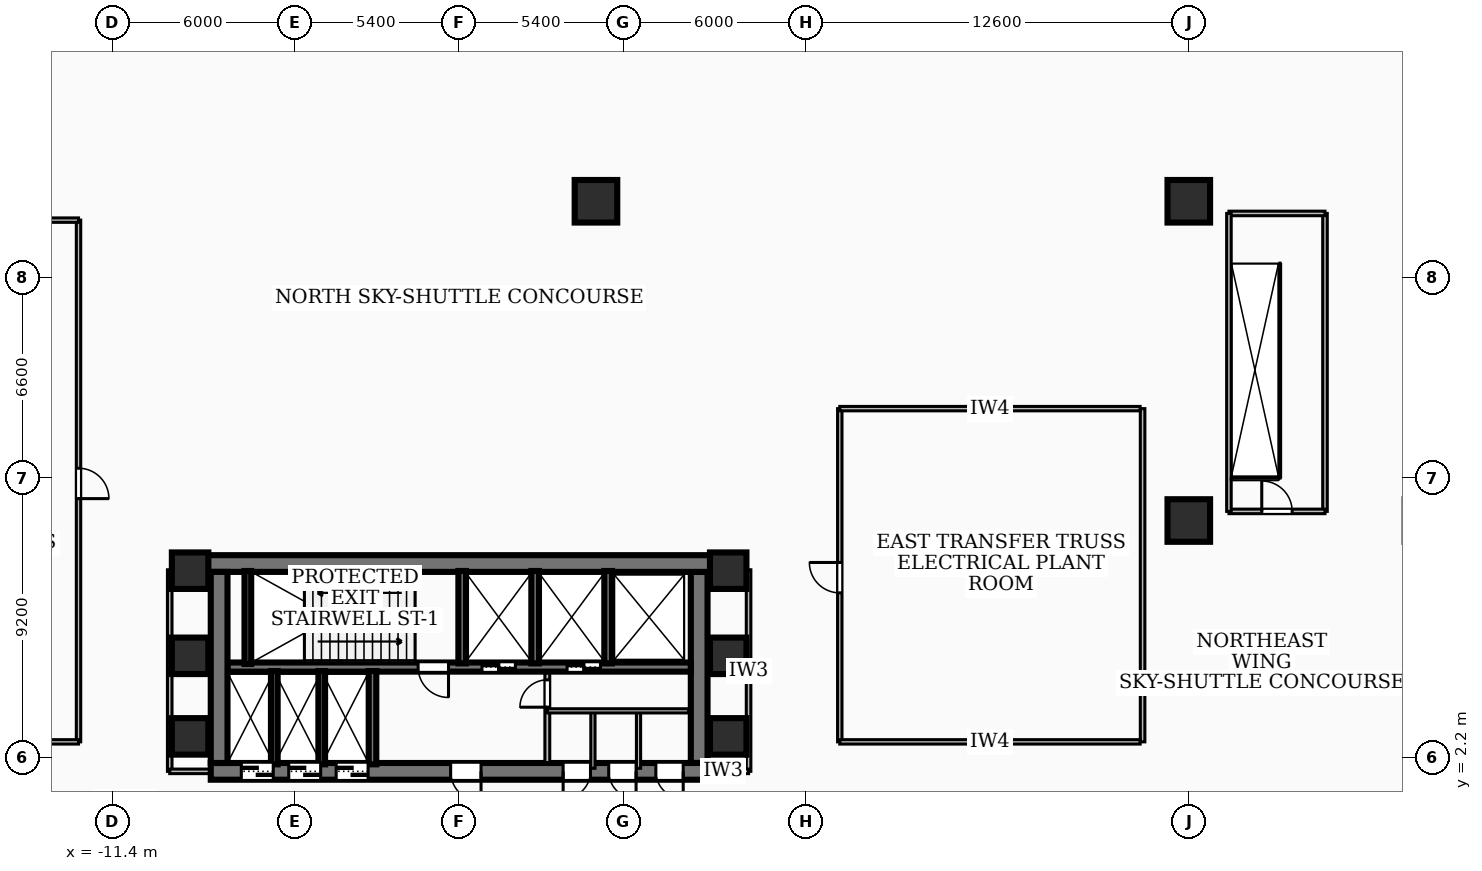
"""IFC4 building model, lengths in metres.
Left out: names, types, materials, properties, quantities, classifications, styles, units other than length and angle.
Written with IfcOpenShell. Run it as: python <this file> out.ifc"""

import sys

from ifc_helpers import new_model, si_unit, direction, frame, frame_2d, origin, origin_2d, place, context, subcontext, project, spatial, rectangle, extrude, element, fill, save


model = new_model("IFC4")
c1 = context("Model", 3, precision=1e-05, world=origin(), true_north=direction((0.0, 1.0)))
c2 = subcontext(c1, "Body", "Model", "MODEL_VIEW")
j1 = project(units=[si_unit("LENGTHUNIT", "METRE"), si_unit("PLANEANGLEUNIT", "RADIAN")], contexts=[c1])
p1 = place(None, origin())
s1 = spatial("IfcSite", under=j1, at=p1, CompositionType="ELEMENT")
p2 = place(p1, origin())
s2 = spatial("IfcBuilding", under=s1, at=p2, CompositionType="ELEMENT")
p3 = place(p2, frame((0.0, 0.0, 19.44)))
s3 = spatial("IfcBuildingStorey", under=s2, at=p3, CompositionType="ELEMENT", Elevation=19.44)
p4 = place(p3, frame((-8.78, 8.585, 0.0), z_axis=(0.0, 0.0, 1.0), x_axis=(1.0, 0.0, 0.0)))
e1 = element("IfcWall", 1, at=p4, inside=s3, PredefinedType="SHEAR", context=c2, shape_type="SweptSolid", body=[
    extrude(rectangle(XDim=17.56, YDim=0.55, at=frame_2d((8.78, 0.0))), origin(), (0.0, 0.0, 1.0), 4.78),
])
p5 = place(p3, frame((8.17, 1.75, 0.0), z_axis=(0.0, 0.0, 1.0), x_axis=(-1.0, 0.0, 0.0)))
e2 = element("IfcWall", 2, at=p5, inside=s3, PredefinedType="SHEAR", context=c2, shape_type="SweptSolid", body=[
    extrude(rectangle(XDim=16.34, YDim=0.55, at=frame_2d((8.17, 0.0))), origin(), (0.0, 0.0, 1.0), 4.78),
])
p6 = place(p5, frame((7.45, 0.0, 0.0)))
e3 = element("IfcOpeningElement", 3, at=p6, cuts=e2, PredefinedType="OPENING", context=c2, shape_type="SweptSolid", body=[
    extrude(rectangle(XDim=1.0, YDim=2.1, at=frame_2d((0.5, 1.05))), frame((0.0, 0.285, 0.0), z_axis=(0.0, -1.0, 0.0), x_axis=(1.0, 0.0, 0.0)), (0.0, 0.0, 1.0), 0.57),
])
p7 = place(p5, frame((14.285, 0.0, 0.0)))
e4 = element("IfcOpeningElement", 4, at=p7, cuts=e2, PredefinedType="OPENING", context=c2, shape_type="SweptSolid", body=[
    extrude(rectangle(XDim=1.05, YDim=2.15, at=frame_2d((0.525, 1.075))), frame((0.0, 0.285, 0.0), z_axis=(0.0, -1.0, 0.0), x_axis=(1.0, 0.0, 0.0)), (0.0, 0.0, 1.0), 0.57),
])
p8 = place(p5, frame((12.725, 0.0, 0.0)))
e5 = element("IfcOpeningElement", 5, at=p8, cuts=e2, PredefinedType="OPENING", context=c2, shape_type="SweptSolid", body=[
    extrude(rectangle(XDim=1.05, YDim=2.15, at=frame_2d((0.525, 1.075))), frame((0.0, 0.285, 0.0), z_axis=(0.0, -1.0, 0.0), x_axis=(1.0, 0.0, 0.0)), (0.0, 0.0, 1.0), 0.57),
])
p9 = place(p5, frame((11.165, 0.0, 0.0)))
e6 = element("IfcOpeningElement", 6, at=p9, cuts=e2, PredefinedType="OPENING", context=c2, shape_type="SweptSolid", body=[
    extrude(rectangle(XDim=1.05, YDim=2.15, at=frame_2d((0.525, 1.075))), frame((0.0, 0.285, 0.0), z_axis=(0.0, -1.0, 0.0), x_axis=(1.0, 0.0, 0.0)), (0.0, 0.0, 1.0), 0.57),
])
p10 = place(p5, frame((3.85, 0.0, 0.0)))
e7 = element("IfcOpeningElement", 7, at=p10, cuts=e2, PredefinedType="OPENING", context=c2, shape_type="SweptSolid", body=[
    extrude(rectangle(XDim=0.9, YDim=2.06, at=frame_2d((0.45, 1.03))), frame((0.0, 0.285, 0.0), z_axis=(0.0, -1.0, 0.0), x_axis=(1.0, 0.0, 0.0)), (0.0, 0.0, 1.0), 0.57),
])
p11 = place(p5, frame((2.35, 0.0, 0.0)))
e8 = element("IfcOpeningElement", 8, at=p11, cuts=e2, PredefinedType="OPENING", context=c2, shape_type="SweptSolid", body=[
    extrude(rectangle(XDim=0.9, YDim=2.06, at=frame_2d((0.45, 1.03))), frame((0.0, 0.285, 0.0), z_axis=(0.0, -1.0, 0.0), x_axis=(1.0, 0.0, 0.0)), (0.0, 0.0, 1.0), 0.57),
])
p12 = place(p5, frame((0.8, 0.0, 0.0)))
e9 = element("IfcOpeningElement", 9, at=p12, cuts=e2, PredefinedType="OPENING", context=c2, shape_type="SweptSolid", body=[
    extrude(rectangle(XDim=0.9, YDim=2.06, at=frame_2d((0.45, 1.03))), frame((0.0, 0.285, 0.0), z_axis=(0.0, -1.0, 0.0), x_axis=(1.0, 0.0, 0.0)), (0.0, 0.0, 1.0), 0.57),
])
for number, where, z_axis, x_axis in (
    (10, (-7.895, 2.025, 0.0), (0.0, 0.0, 1.0), (0.0, 1.0, 0.0)),
    (11, (7.895, 8.31, 0.0), (0.0, 0.0, 1.0), (0.0, -1.0, 0.0)),
):
    element("IfcWall", number, at=place(p3, frame(where, z_axis=z_axis, x_axis=x_axis)), inside=s3, PredefinedType="SHEAR", context=c2, shape_type="SweptSolid", body=[
        extrude(rectangle(XDim=6.285, YDim=0.55, at=frame_2d((3.143, 0.0))), origin(), (0.0, 0.0, 1.0), 4.78),
    ])
p13 = place(p3, frame((7.62, 5.18, 0.0), z_axis=(0.0, 0.0, 1.0), x_axis=(-1.0, 0.0, 0.0)))
e12 = element("IfcWall", 12, at=p13, inside=s3, PredefinedType="SOLIDWALL", context=c2, shape_type="SweptSolid", body=[
    extrude(rectangle(XDim=15.24, YDim=0.3, at=frame_2d((7.62, 0.0))), origin(), (0.0, 0.0, 1.0), 4.78),
])
p14 = place(p13, frame((5.77, 0.0, 0.0)))
e13 = element("IfcOpeningElement", 13, at=p14, cuts=e12, PredefinedType="OPENING", context=c2, shape_type="SweptSolid", body=[
    extrude(rectangle(XDim=1.1, YDim=2.15, at=frame_2d((0.55, 1.075))), frame((0.0, 0.16, 0.0), z_axis=(0.0, -1.0, 0.0), x_axis=(1.0, 0.0, 0.0)), (0.0, 0.0, 1.0), 0.32),
])
p15 = place(p13, frame((2.97, 0.0, 0.0)))
e14 = element("IfcOpeningElement", 14, at=p15, cuts=e12, PredefinedType="OPENING", context=c2, shape_type="SweptSolid", body=[
    extrude(rectangle(XDim=1.1, YDim=2.15, at=frame_2d((0.55, 1.075))), frame((0.0, 0.16, 0.0), z_axis=(0.0, -1.0, 0.0), x_axis=(1.0, 0.0, 0.0)), (0.0, 0.0, 1.0), 0.32),
])
p16 = place(p13, frame((7.97, 0.0, 0.0)))
e15 = element("IfcOpeningElement", 15, at=p16, cuts=e12, PredefinedType="OPENING", context=c2, shape_type="SweptSolid", body=[
    extrude(rectangle(XDim=1.0, YDim=2.1, at=frame_2d((0.5, 1.05))), frame((0.0, 0.16, 0.0), z_axis=(0.0, -1.0, 0.0), x_axis=(1.0, 0.0, 0.0)), (0.0, 0.0, 1.0), 0.32),
])
p17 = place(p3, frame((-6.95, 5.28, 0.0), z_axis=(0.0, 0.0, 1.0), x_axis=(0.0, 1.0, 0.0)))
e16 = element("IfcWall", 16, at=p17, inside=s3, PredefinedType="SOLIDWALL", context=c2, shape_type="SweptSolid", body=[
    extrude(rectangle(XDim=3.06, YDim=0.22, at=frame_2d((1.53, 0.0))), origin(), (0.0, 0.0, 1.0), 4.78),
])
for number, where, z_axis, x_axis in (
    (17, (0.1, 5.3, 0.0), (0.0, 0.0, 1.0), (0.0, 1.0, 0.0)),
    (18, (2.5, 5.3, 0.0), (0.0, 0.0, 1.0), (0.0, 1.0, 0.0)),
    (19, (4.9, 5.3, 0.0), (0.0, 0.0, 1.0), (0.0, 1.0, 0.0)),
):
    element("IfcWall", number, at=place(p3, frame(where, z_axis=z_axis, x_axis=x_axis)), inside=s3, PredefinedType="SOLIDWALL", context=c2, shape_type="SweptSolid", body=[
        extrude(rectangle(XDim=3.04, YDim=0.25, at=frame_2d((1.52, 0.0))), origin(), (0.0, 0.0, 1.0), 4.78),
    ])
p18 = place(p3, frame((-2.85, 1.98, 0.0), z_axis=(0.0, 0.0, 1.0), x_axis=(0.0, 1.0, 0.0)))
e20 = element("IfcWall", 20, at=p18, inside=s3, PredefinedType="SOLIDWALL", context=c2, shape_type="SweptSolid", body=[
    extrude(rectangle(XDim=3.07, YDim=0.25, at=frame_2d((1.535, 0.0))), origin(), (0.0, 0.0, 1.0), 4.78),
])
for number, where, z_axis, x_axis in (
    (21, (-6.08, 1.98, 0.0), (0.0, 0.0, 1.0), (0.0, 1.0, 0.0)),
    (22, (-4.52, 1.98, 0.0), (0.0, 0.0, 1.0), (0.0, 1.0, 0.0)),
):
    element("IfcWall", number, at=place(p3, frame(where, z_axis=z_axis, x_axis=x_axis)), inside=s3, PredefinedType="SOLIDWALL", context=c2, shape_type="SweptSolid", body=[
        extrude(rectangle(XDim=3.07, YDim=0.22, at=frame_2d((1.535, 0.0))), origin(), (0.0, 0.0, 1.0), 4.78),
    ])
for number, where, z_axis, x_axis in (
    (23, (-8.85, 2.9, 0.0), (0.0, 0.0, 1.0), (1.0, 0.0, 0.0)),
    (24, (-8.85, 5.55, 0.0), (0.0, 0.0, 1.0), (1.0, 0.0, 0.0)),
    (25, (8.85, 2.9, 0.0), (0.0, 0.0, 1.0), (1.0, 0.0, 0.0)),
    (26, (8.85, 5.55, 0.0), (0.0, 0.0, 1.0), (1.0, 0.0, 0.0)),
    (27, (-8.85, 8.35, 0.0), (0.0, 0.0, 1.0), (1.0, 0.0, 0.0)),
    (28, (8.85, 8.35, 0.0), (0.0, 0.0, 1.0), (1.0, 0.0, 0.0)),
):
    element("IfcColumn", number, at=place(p3, frame(where, z_axis=z_axis, x_axis=x_axis)), inside=s3, PredefinedType="COLUMN", context=c2, shape_type="SweptSolid", body=[
        extrude(rectangle(XDim=1.2, YDim=1.2, at=origin_2d()), origin(), (0.0, 0.0, 1.0), 5.04),
    ])
for number, where, z_axis, x_axis in (
    (29, (24.0, 10.0, 0.0), (0.0, 0.0, 1.0), (1.0, 0.0, 0.0)),
    (30, (4.5, 20.5, 0.0), (0.0, 0.0, 1.0), (1.0, 0.0, 0.0)),
    (31, (24.0, 20.5, 0.0), (0.0, 0.0, 1.0), (1.0, 0.0, 0.0)),
):
    element("IfcColumn", number, at=place(p3, frame(where, z_axis=z_axis, x_axis=x_axis)), inside=s3, PredefinedType="COLUMN", context=c2, shape_type="SweptSolid", body=[
        extrude(rectangle(XDim=1.4, YDim=1.4, at=origin_2d()), origin(), (0.0, 0.0, 1.0), 5.04),
    ])
for number, where, z_axis, x_axis in (
    (32, (25.32, 10.3, 0.0), (0.0, 0.0, 1.0), (0.0, 1.0, 0.0)),
    (33, (28.48, 10.3, 0.0), (0.0, 0.0, 1.0), (0.0, 1.0, 0.0)),
):
    element("IfcWall", number, at=place(p3, frame(where, z_axis=z_axis, x_axis=x_axis)), inside=s3, PredefinedType="PARTITIONING", context=c2, shape_type="SweptSolid", body=[
        extrude(rectangle(XDim=9.8, YDim=0.15, at=frame_2d((4.9, 0.0))), origin(), (0.0, 0.0, 1.0), 2.572),
    ])
p19 = place(p3, frame((25.32, 10.3, 0.0), z_axis=(0.0, 0.0, 1.0), x_axis=(1.0, 0.0, 0.0)))
e34 = element("IfcWall", 34, at=p19, inside=s3, PredefinedType="PARTITIONING", context=c2, shape_type="SweptSolid", body=[
    extrude(rectangle(XDim=3.16, YDim=0.15, at=frame_2d((1.58, 0.0))), origin(), (0.0, 0.0, 1.0), 2.572),
])
p20 = place(p19, frame((1.08, 0.0, 0.0)))
e35 = element("IfcOpeningElement", 35, at=p20, cuts=e34, PredefinedType="OPENING", context=c2, shape_type="SweptSolid", body=[
    extrude(rectangle(XDim=1.0, YDim=2.1, at=frame_2d((0.5, 1.05))), frame((0.0, 0.085, 0.0), z_axis=(0.0, -1.0, 0.0), x_axis=(1.0, 0.0, 0.0)), (0.0, 0.0, 1.0), 0.17),
])
p21 = place(p3, frame((28.48, 20.1, 0.0), z_axis=(0.0, 0.0, 1.0), x_axis=(-1.0, 0.0, 0.0)))
e36 = element("IfcWall", 36, at=p21, inside=s3, PredefinedType="PARTITIONING", context=c2, shape_type="SweptSolid", body=[
    extrude(rectangle(XDim=3.16, YDim=0.15, at=frame_2d((1.58, 0.0))), origin(), (0.0, 0.0, 1.0), 4.78),
])
p22 = place(p3, frame((2.9, 2.04, 0.0), z_axis=(0.0, 0.0, 1.0), x_axis=(0.0, 1.0, 0.0)))
e37 = element("IfcWall", 37, at=p22, inside=s3, PredefinedType="PARTITIONING", context=c2, shape_type="SweptSolid", body=[
    extrude(rectangle(XDim=2.94, YDim=0.16, at=frame_2d((1.47, 0.0))), origin(), (0.0, 0.0, 1.0), 3.845),
])
p23 = place(p22, frame((1.82, 0.0, 0.0)))
e38 = element("IfcOpeningElement", 38, at=p23, cuts=e37, PredefinedType="OPENING", context=c2, shape_type="SweptSolid", body=[
    extrude(rectangle(XDim=0.9, YDim=2.06, at=frame_2d((0.45, 1.03))), frame((0.0, 0.09, 0.0), z_axis=(0.0, -1.0, 0.0), x_axis=(1.0, 0.0, 0.0)), (0.0, 0.0, 1.0), 0.18),
])
p24 = place(p3, frame((2.9, 3.74, 0.0), z_axis=(0.0, 0.0, 1.0), x_axis=(1.0, 0.0, 0.0)))
e39 = element("IfcWall", 39, at=p24, inside=s3, PredefinedType="PARTITIONING", context=c2, shape_type="SweptSolid", body=[
    extrude(rectangle(XDim=4.65, YDim=0.138, at=frame_2d((2.325, 0.0))), origin(), (0.0, 0.0, 1.0), 4.78),
])
for number, where, z_axis, x_axis in (
    (40, (4.4, 1.85, 0.0), (0.0, 0.0, 1.0), (0.0, 1.0, 0.0)),
    (41, (5.9, 1.85, 0.0), (0.0, 0.0, 1.0), (0.0, 1.0, 0.0)),
):
    element("IfcWall", number, at=place(p3, frame(where, z_axis=z_axis, x_axis=x_axis)), inside=s3, PredefinedType="PARTITIONING", context=c2, shape_type="SweptSolid", body=[
        extrude(rectangle(XDim=1.89, YDim=0.138, at=frame_2d((0.945, 0.0))), origin(), (0.0, 0.0, 1.0), 3.845),
    ])
p25 = place(p3, frame((-9.52, 1.75, 0.0), z_axis=(0.0, 0.0, 1.0), x_axis=(0.0, 1.0, 0.0)))
e42 = element("IfcWall", 42, at=p25, inside=s3, PredefinedType="PARTITIONING", context=c2, shape_type="SweptSolid", body=[
    extrude(rectangle(XDim=6.63, YDim=0.15, at=frame_2d((3.315, 0.0))), origin(), (0.0, 0.0, 1.0), 2.572),
])
p26 = place(p3, frame((-7.85, 1.75, 0.0), z_axis=(0.0, 0.0, 1.0), x_axis=(-1.0, 0.0, 0.0)))
e43 = element("IfcWall", 43, at=p26, inside=s3, PredefinedType="PARTITIONING", context=c2, shape_type="SweptSolid", body=[
    extrude(rectangle(XDim=1.67, YDim=0.15, at=frame_2d((0.835, 0.0))), origin(), (0.0, 0.0, 1.0), 3.845),
])
p27 = place(p3, frame((9.52, 1.75, 0.0), z_axis=(0.0, 0.0, 1.0), x_axis=(0.0, 1.0, 0.0)))
e44 = element("IfcWall", 44, at=p27, inside=s3, PredefinedType="PARTITIONING", context=c2, shape_type="SweptSolid", body=[
    extrude(rectangle(XDim=6.63, YDim=0.15, at=frame_2d((3.315, 0.0))), origin(), (0.0, 0.0, 1.0), 2.572),
])
p28 = place(p3, frame((7.85, 1.75, 0.0), z_axis=(0.0, 0.0, 1.0), x_axis=(1.0, 0.0, 0.0)))
e45 = element("IfcWall", 45, at=p28, inside=s3, PredefinedType="PARTITIONING", context=c2, shape_type="SweptSolid", body=[
    extrude(rectangle(XDim=1.67, YDim=0.15, at=frame_2d((0.835, 0.0))), origin(), (0.0, 0.0, 1.0), 3.845),
])
p29 = place(p3, frame((-12.52, 19.88, 0.0), z_axis=(0.0, 0.0, 1.0), x_axis=(0.0, -1.0, 0.0)))
e46 = element("IfcWall", 46, at=p29, inside=s3, PredefinedType="PARTITIONING", context=c2, shape_type="SweptSolid", body=[
    extrude(rectangle(XDim=17.16, YDim=0.145, at=frame_2d((8.58, 0.0))), origin(), (0.0, 0.0, 1.0), 2.572),
])
p30 = place(p29, frame((8.16, 0.0, 0.0)))
e47 = element("IfcOpeningElement", 47, at=p30, cuts=e46, PredefinedType="OPENING", context=c2, shape_type="SweptSolid", body=[
    extrude(rectangle(XDim=1.0, YDim=2.1, at=frame_2d((0.5, 1.05))), frame((0.0, 0.083, 0.0), z_axis=(0.0, -1.0, 0.0), x_axis=(1.0, 0.0, 0.0)), (0.0, 0.0, 1.0), 0.165),
])
p31 = place(p3, frame((-22.4, 2.72, 0.0), z_axis=(0.0, 0.0, 1.0), x_axis=(1.0, 0.0, 0.0)))
e48 = element("IfcWall", 48, at=p31, inside=s3, PredefinedType="PARTITIONING", context=c2, shape_type="SweptSolid", body=[
    extrude(rectangle(XDim=9.88, YDim=0.145, at=frame_2d((4.94, 0.0))), origin(), (0.0, 0.0, 1.0), 2.572),
])
p32 = place(p3, frame((-22.4, 19.88, 0.0), z_axis=(0.0, 0.0, 1.0), x_axis=(1.0, 0.0, 0.0)))
e49 = element("IfcWall", 49, at=p32, inside=s3, PredefinedType="PARTITIONING", context=c2, shape_type="SweptSolid", body=[
    extrude(rectangle(XDim=9.88, YDim=0.145, at=frame_2d((4.94, 0.0))), origin(), (0.0, 0.0, 1.0), 4.78),
])
p33 = place(p3, frame((12.52, 2.72, 0.0), z_axis=(0.0, 0.0, 1.0), x_axis=(0.0, 1.0, 0.0)))
e50 = element("IfcWall", 50, at=p33, inside=s3, PredefinedType="PARTITIONING", context=c2, shape_type="SweptSolid", body=[
    extrude(rectangle(XDim=10.96, YDim=0.145, at=frame_2d((5.48, 0.0))), origin(), (0.0, 0.0, 1.0), 2.572),
])
p34 = place(p33, frame((4.9, 0.0, 0.0)))
e51 = element("IfcOpeningElement", 51, at=p34, cuts=e50, PredefinedType="OPENING", context=c2, shape_type="SweptSolid", body=[
    extrude(rectangle(XDim=1.0, YDim=2.1, at=frame_2d((0.5, 1.05))), frame((0.0, 0.083, 0.0), z_axis=(0.0, -1.0, 0.0), x_axis=(1.0, 0.0, 0.0)), (0.0, 0.0, 1.0), 0.165),
])
p35 = place(p3, frame((12.52, 2.72, 0.0), z_axis=(0.0, 0.0, 1.0), x_axis=(1.0, 0.0, 0.0)))
e52 = element("IfcWall", 52, at=p35, inside=s3, PredefinedType="PARTITIONING", context=c2, shape_type="SweptSolid", body=[
    extrude(rectangle(XDim=9.88, YDim=0.145, at=frame_2d((4.94, 0.0))), origin(), (0.0, 0.0, 1.0), 2.572),
])
p36 = place(p3, frame((12.52, 13.68, 0.0), z_axis=(0.0, 0.0, 1.0), x_axis=(1.0, 0.0, 0.0)))
e53 = element("IfcWall", 53, at=p36, inside=s3, PredefinedType="PARTITIONING", context=c2, shape_type="SweptSolid", body=[
    extrude(rectangle(XDim=9.88, YDim=0.145, at=frame_2d((4.94, 0.0))), origin(), (0.0, 0.0, 1.0), 4.78),
])
p37 = place(p3, frame((22.48, 2.72, 0.0), z_axis=(0.0, 0.0, 1.0), x_axis=(0.0, 1.0, 0.0)))
e54 = element("IfcWall", 54, at=p37, inside=s3, PredefinedType="PARTITIONING", context=c2, shape_type="SweptSolid", body=[
    extrude(rectangle(XDim=10.96, YDim=0.15, at=frame_2d((5.48, 0.0))), origin(), (0.0, 0.0, 1.0), 2.572),
])
p38 = place(p20, origin())
e55 = element("IfcDoor", 55, at=p38, inside=s3, OperationType="SINGLE_SWING_LEFT", PredefinedType="DOOR", context=c2, shape_type="SweptSolid", body=[
    extrude(rectangle(XDim=1.0, YDim=2.1, at=frame_2d((0.5, 1.05))), frame((0.0, 0.025, 0.0), z_axis=(0.0, -1.0, 0.0), x_axis=(1.0, 0.0, 0.0)), (0.0, 0.0, 1.0), 0.05),
])
fill(e35, e55)
p39 = place(p6, origin())
e56 = element("IfcDoor", 56, at=p39, inside=s3, OperationType="SINGLE_SWING_LEFT", PredefinedType="DOOR", context=c2, shape_type="SweptSolid", body=[
    extrude(rectangle(XDim=1.0, YDim=2.1, at=frame_2d((0.5, 1.05))), frame((0.0, 0.025, 0.0), z_axis=(0.0, -1.0, 0.0), x_axis=(1.0, 0.0, 0.0)), (0.0, 0.0, 1.0), 0.05),
])
fill(e3, e56)
p40 = place(p14, origin())
e57 = element("IfcDoor", 57, at=p40, inside=s3, OperationType="DOUBLE_DOOR_SLIDING", PredefinedType="DOOR", context=c2, shape_type="SweptSolid", body=[
    extrude(rectangle(XDim=1.1, YDim=2.15, at=frame_2d((0.55, 1.075))), frame((0.0, 0.025, 0.0), z_axis=(0.0, -1.0, 0.0), x_axis=(1.0, 0.0, 0.0)), (0.0, 0.0, 1.0), 0.05),
])
fill(e13, e57)
p41 = place(p15, origin())
e58 = element("IfcDoor", 58, at=p41, inside=s3, OperationType="DOUBLE_DOOR_SLIDING", PredefinedType="DOOR", context=c2, shape_type="SweptSolid", body=[
    extrude(rectangle(XDim=1.1, YDim=2.15, at=frame_2d((0.55, 1.075))), frame((0.0, 0.025, 0.0), z_axis=(0.0, -1.0, 0.0), x_axis=(1.0, 0.0, 0.0)), (0.0, 0.0, 1.0), 0.05),
])
fill(e14, e58)
p42 = place(p16, origin())
e59 = element("IfcDoor", 59, at=p42, inside=s3, OperationType="SINGLE_SWING_LEFT", PredefinedType="DOOR", context=c2, shape_type="SweptSolid", body=[
    extrude(rectangle(XDim=1.0, YDim=2.1, at=frame_2d((0.5, 1.05))), frame((0.0, 0.025, 0.0), z_axis=(0.0, -1.0, 0.0), x_axis=(1.0, 0.0, 0.0)), (0.0, 0.0, 1.0), 0.05),
])
fill(e15, e59)
p43 = place(p7, origin())
e60 = element("IfcDoor", 60, at=p43, inside=s3, OperationType="DOUBLE_DOOR_SLIDING", PredefinedType="DOOR", context=c2, shape_type="SweptSolid", body=[
    extrude(rectangle(XDim=1.05, YDim=2.15, at=frame_2d((0.525, 1.075))), frame((0.0, 0.025, 0.0), z_axis=(0.0, -1.0, 0.0), x_axis=(1.0, 0.0, 0.0)), (0.0, 0.0, 1.0), 0.05),
])
fill(e4, e60)
p44 = place(p8, origin())
e61 = element("IfcDoor", 61, at=p44, inside=s3, OperationType="DOUBLE_DOOR_SLIDING", PredefinedType="DOOR", context=c2, shape_type="SweptSolid", body=[
    extrude(rectangle(XDim=1.05, YDim=2.15, at=frame_2d((0.525, 1.075))), frame((0.0, 0.025, 0.0), z_axis=(0.0, -1.0, 0.0), x_axis=(1.0, 0.0, 0.0)), (0.0, 0.0, 1.0), 0.05),
])
fill(e5, e61)
p45 = place(p9, origin())
e62 = element("IfcDoor", 62, at=p45, inside=s3, OperationType="DOUBLE_DOOR_SLIDING", PredefinedType="DOOR", context=c2, shape_type="SweptSolid", body=[
    extrude(rectangle(XDim=1.05, YDim=2.15, at=frame_2d((0.525, 1.075))), frame((0.0, 0.025, 0.0), z_axis=(0.0, -1.0, 0.0), x_axis=(1.0, 0.0, 0.0)), (0.0, 0.0, 1.0), 0.05),
])
fill(e6, e62)
p46 = place(p10, origin())
e63 = element("IfcDoor", 63, at=p46, inside=s3, OperationType="SINGLE_SWING_RIGHT", PredefinedType="DOOR", context=c2, shape_type="SweptSolid", body=[
    extrude(rectangle(XDim=0.9, YDim=2.06, at=frame_2d((0.45, 1.03))), frame((0.0, 0.025, 0.0), z_axis=(0.0, -1.0, 0.0), x_axis=(1.0, 0.0, 0.0)), (0.0, 0.0, 1.0), 0.05),
])
fill(e7, e63)
p47 = place(p11, origin())
e64 = element("IfcDoor", 64, at=p47, inside=s3, OperationType="SINGLE_SWING_LEFT", PredefinedType="DOOR", context=c2, shape_type="SweptSolid", body=[
    extrude(rectangle(XDim=0.9, YDim=2.06, at=frame_2d((0.45, 1.03))), frame((0.0, 0.025, 0.0), z_axis=(0.0, -1.0, 0.0), x_axis=(1.0, 0.0, 0.0)), (0.0, 0.0, 1.0), 0.05),
])
fill(e8, e64)
p48 = place(p12, origin())
e65 = element("IfcDoor", 65, at=p48, inside=s3, OperationType="SINGLE_SWING_LEFT", PredefinedType="DOOR", context=c2, shape_type="SweptSolid", body=[
    extrude(rectangle(XDim=0.9, YDim=2.06, at=frame_2d((0.45, 1.03))), frame((0.0, 0.025, 0.0), z_axis=(0.0, -1.0, 0.0), x_axis=(1.0, 0.0, 0.0)), (0.0, 0.0, 1.0), 0.05),
])
fill(e9, e65)
p49 = place(p23, origin())
e66 = element("IfcDoor", 66, at=p49, inside=s3, OperationType="SINGLE_SWING_LEFT", PredefinedType="DOOR", context=c2, shape_type="SweptSolid", body=[
    extrude(rectangle(XDim=0.9, YDim=2.06, at=frame_2d((0.45, 1.03))), frame((0.0, 0.025, 0.0), z_axis=(0.0, -1.0, 0.0), x_axis=(1.0, 0.0, 0.0)), (0.0, 0.0, 1.0), 0.05),
])
fill(e38, e66)
p50 = place(p30, origin())
e67 = element("IfcDoor", 67, at=p50, inside=s3, OperationType="SINGLE_SWING_RIGHT", PredefinedType="DOOR", context=c2, shape_type="SweptSolid", body=[
    extrude(rectangle(XDim=1.0, YDim=2.1, at=frame_2d((0.5, 1.05))), frame((0.0, 0.025, 0.0), z_axis=(0.0, -1.0, 0.0), x_axis=(1.0, 0.0, 0.0)), (0.0, 0.0, 1.0), 0.05),
])
fill(e47, e67)
p51 = place(p34, origin())
e68 = element("IfcDoor", 68, at=p51, inside=s3, OperationType="SINGLE_SWING_RIGHT", PredefinedType="DOOR", context=c2, shape_type="SweptSolid", body=[
    extrude(rectangle(XDim=1.0, YDim=2.1, at=frame_2d((0.5, 1.05))), frame((0.0, 0.025, 0.0), z_axis=(0.0, -1.0, 0.0), x_axis=(1.0, 0.0, 0.0)), (0.0, 0.0, 1.0), 0.05),
])
fill(e51, e68)
save(model, sys.argv[1])
